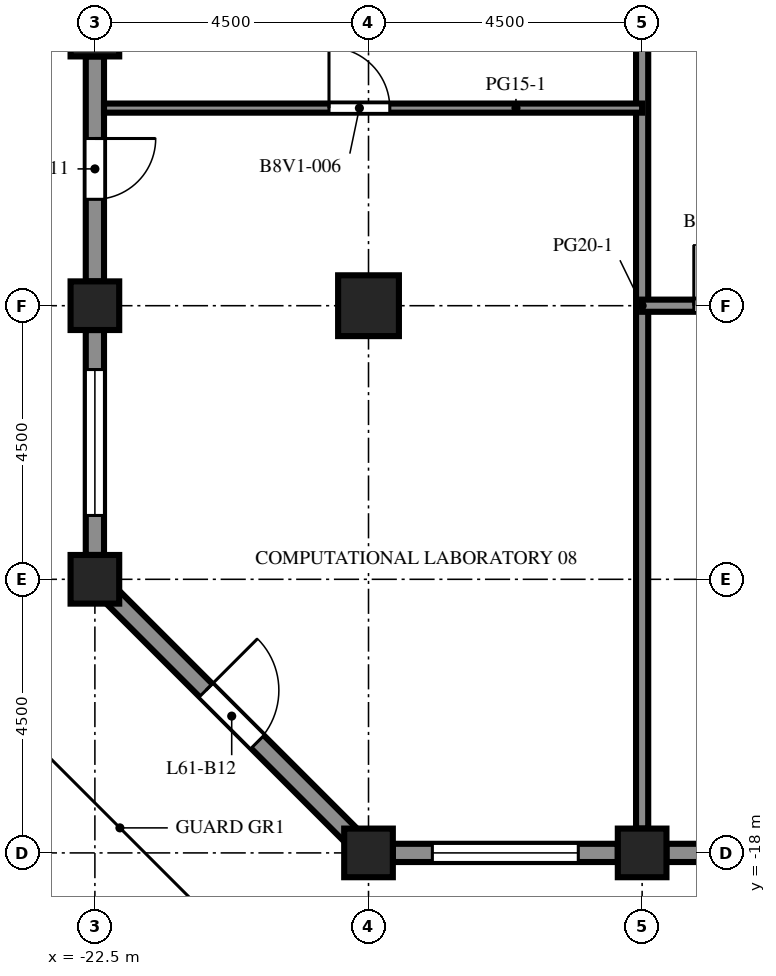
"""IFC4 building model, lengths in metres.
Left out: names, types, materials, properties, quantities, classifications, styles, units other than length and angle.
Written with IfcOpenShell. Run it as: python <this file> out.ifc"""

import sys

from ifc_helpers import new_model, si_unit, direction, frame, frame_2d, origin, origin_2d, place, context, subcontext, project, spatial, rectangle, extrude, element, fill, save


model = new_model("IFC4")
c1 = context("Model", 3, precision=1e-05, world=origin(), true_north=direction((0.0, 1.0)))
c2 = subcontext(c1, "Body", "Model", "MODEL_VIEW")
j1 = project(units=[si_unit("LENGTHUNIT", "METRE"), si_unit("PLANEANGLEUNIT", "RADIAN")], contexts=[c1])
p1 = place(None, origin())
s1 = spatial("IfcSite", under=j1, at=p1, CompositionType="ELEMENT")
p2 = place(p1, origin())
s2 = spatial("IfcBuilding", under=s1, at=p2, CompositionType="ELEMENT")
p3 = place(p2, frame((0.0, 0.0, 270.4)))
s3 = spatial("IfcBuildingStorey", under=s2, at=p3, CompositionType="ELEMENT", Elevation=270.4)
for number, where, z_axis, x_axis in (
    (1, (-22.5, -13.5, 0.0), (0.0, 0.0, 1.0), (1.0, 0.0, 0.0)),
    (2, (-22.5, -9.0, 0.0), (0.0, 0.0, 1.0), (1.0, 0.0, 0.0)),
    (3, (-22.5, -4.5, 0.0), (0.0, 0.0, 1.0), (1.0, 0.0, 0.0)),
    (4, (-18.0, -18.0, 0.0), (0.0, 0.0, 1.0), (1.0, 0.0, 0.0)),
    (5, (-13.5, -18.0, 0.0), (0.0, 0.0, 1.0), (1.0, 0.0, 0.0)),
):
    element("IfcColumn", number, at=place(p3, frame(where, z_axis=z_axis, x_axis=x_axis)), inside=s3, PredefinedType="COLUMN", context=c2, shape_type="SweptSolid", body=[
        extrude(rectangle(XDim=0.8, YDim=0.8, at=origin_2d()), origin(), (0.0, 0.0, 1.0), 4.1),
    ])
p4 = place(p3, frame((-18.0, -9.0, 0.0), z_axis=(0.0, 0.0, 1.0), x_axis=(1.0, 0.0, 0.0)))
e6 = element("IfcColumn", 6, at=p4, inside=s3, PredefinedType="COLUMN", context=c2, shape_type="SweptSolid", body=[
    extrude(rectangle(XDim=1.0, YDim=1.0, at=origin_2d()), origin(), (0.0, 0.0, 1.0), 4.1),
])
p5 = place(p3, frame((-13.9, -18.0, 0.0), z_axis=(0.0, 0.0, 1.0), x_axis=(-1.0, 0.0, 0.0)))
e7 = element("IfcWall", 7, at=p5, inside=s3, PredefinedType="SOLIDWALL", context=c2, shape_type="SweptSolid", body=[
    extrude(rectangle(XDim=3.7, YDim=0.3, at=frame_2d((1.85, 0.0))), origin(), (0.0, 0.0, 1.0), 2.85),
])
p6 = place(p5, frame((0.65, 0.0, 0.8)))
e8 = element("IfcOpeningElement", 8, at=p6, cuts=e7, PredefinedType="OPENING", context=c2, shape_type="SweptSolid", body=[
    extrude(rectangle(XDim=2.4, YDim=1.7, at=frame_2d((1.2, 0.85))), frame((0.0, 0.16, 0.0), z_axis=(0.0, -1.0, 0.0), x_axis=(1.0, 0.0, 0.0)), (0.0, 0.0, 1.0), 0.32),
])
p7 = place(p3, frame((-9.4, -18.0, 0.0), z_axis=(0.0, 0.0, 1.0), x_axis=(-1.0, 0.0, 0.0)))
e9 = element("IfcWall", 9, at=p7, inside=s3, PredefinedType="SOLIDWALL", context=c2, shape_type="SweptSolid", body=[
    extrude(rectangle(XDim=3.7, YDim=0.3, at=frame_2d((1.85, 0.0))), origin(), (0.0, 0.0, 1.0), 2.85),
])
p8 = place(p7, frame((1.35, 0.0, 0.0)))
e10 = element("IfcOpeningElement", 10, at=p8, cuts=e9, PredefinedType="OPENING", context=c2, shape_type="SweptSolid", body=[
    extrude(rectangle(XDim=1.0, YDim=2.2, at=frame_2d((0.5, 1.1))), frame((0.0, 0.16, 0.0), z_axis=(0.0, -1.0, 0.0), x_axis=(1.0, 0.0, 0.0)), (0.0, 0.0, 1.0), 0.32),
])
p9 = place(p3, frame((-22.5, -8.6, 0.0), z_axis=(0.0, 0.0, 1.0), x_axis=(0.0, 1.0, 0.0)))
e11 = element("IfcWall", 11, at=p9, inside=s3, PredefinedType="SOLIDWALL", context=c2, shape_type="SweptSolid", body=[
    extrude(rectangle(XDim=3.7, YDim=0.3, at=frame_2d((1.85, 0.0))), origin(), (0.0, 0.0, 1.0), 2.85),
])
p10 = place(p9, frame((1.35, 0.0, 0.0)))
e12 = element("IfcOpeningElement", 12, at=p10, cuts=e11, PredefinedType="OPENING", context=c2, shape_type="SweptSolid", body=[
    extrude(rectangle(XDim=1.0, YDim=2.2, at=frame_2d((0.5, 1.1))), frame((0.0, 0.16, 0.0), z_axis=(0.0, -1.0, 0.0), x_axis=(1.0, 0.0, 0.0)), (0.0, 0.0, 1.0), 0.32),
])
p11 = place(p3, frame((-22.5, -13.1, 0.0), z_axis=(0.0, 0.0, 1.0), x_axis=(0.0, 1.0, 0.0)))
e13 = element("IfcWall", 13, at=p11, inside=s3, PredefinedType="SOLIDWALL", context=c2, shape_type="SweptSolid", body=[
    extrude(rectangle(XDim=3.7, YDim=0.3, at=frame_2d((1.85, 0.0))), origin(), (0.0, 0.0, 1.0), 2.85),
])
p12 = place(p11, frame((0.65, 0.0, 0.8)))
e14 = element("IfcOpeningElement", 14, at=p12, cuts=e13, PredefinedType="OPENING", context=c2, shape_type="SweptSolid", body=[
    extrude(rectangle(XDim=2.4, YDim=1.7, at=frame_2d((1.2, 0.85))), frame((0.0, 0.16, 0.0), z_axis=(0.0, -1.0, 0.0), x_axis=(1.0, 0.0, 0.0)), (0.0, 0.0, 1.0), 0.32),
])
p13 = place(p3, frame((-18.294, -17.706, 0.0), z_axis=(0.0, 0.0, 1.0), x_axis=(-0.707106781187, 0.707106781187, 0.0)))
e15 = element("IfcWall", 15, at=p13, inside=s3, PredefinedType="SOLIDWALL", context=c2, shape_type="SweptSolid", body=[
    extrude(rectangle(XDim=5.532, YDim=0.3, at=frame_2d((2.766, 0.0))), origin(), (0.0, 0.0, 1.0), 2.85),
])
p14 = place(p13, frame((2.166, 0.0, 0.0)))
e16 = element("IfcOpeningElement", 16, at=p14, cuts=e15, PredefinedType="OPENING", context=c2, shape_type="SweptSolid", body=[
    extrude(rectangle(XDim=1.2, YDim=2.2, at=frame_2d((0.6, 1.1))), frame((0.0, 0.16, 0.0), z_axis=(0.0, -1.0, 0.0), x_axis=(1.0, 0.0, 0.0)), (0.0, 0.0, 1.0), 0.32),
])
p15 = place(p3, frame((-13.5, -17.6, 0.0), z_axis=(0.0, 0.0, 1.0), x_axis=(0.0, 1.0, 0.0)))
e17 = element("IfcWall", 17, at=p15, inside=s3, PredefinedType="PARTITIONING", context=c2, shape_type="SweptSolid", body=[
    extrude(rectangle(XDim=20.85, YDim=0.2, at=frame_2d((10.425, 0.0))), origin(), (0.0, 0.0, 1.0), 3.65),
])
p16 = place(p15, frame((17.2, 0.0, 0.0)))
e18 = element("IfcOpeningElement", 18, at=p16, cuts=e17, PredefinedType="OPENING", context=c2, shape_type="SweptSolid", body=[
    extrude(rectangle(XDim=1.0, YDim=2.1, at=frame_2d((0.5, 1.05))), frame((0.0, 0.11, 0.0), z_axis=(0.0, -1.0, 0.0), x_axis=(1.0, 0.0, 0.0)), (0.0, 0.0, 1.0), 0.22),
])
p17 = place(p3, frame((-10.5, -9.0, 0.0), z_axis=(0.0, 0.0, 1.0), x_axis=(-1.0, 0.0, 0.0)))
e19 = element("IfcWall", 19, at=p17, inside=s3, PredefinedType="PARTITIONING", context=c2, shape_type="SweptSolid", body=[
    extrude(rectangle(XDim=3.0, YDim=0.2, at=frame_2d((1.5, 0.0))), origin(), (0.0, 0.0, 1.0), 3.65),
])
p18 = place(p17, frame((1.15, 0.0, 0.0)))
e20 = element("IfcOpeningElement", 20, at=p18, cuts=e19, PredefinedType="OPENING", context=c2, shape_type="SweptSolid", body=[
    extrude(rectangle(XDim=1.0, YDim=2.1, at=frame_2d((0.5, 1.05))), frame((0.0, 0.11, 0.0), z_axis=(0.0, -1.0, 0.0), x_axis=(1.0, 0.0, 0.0)), (0.0, 0.0, 1.0), 0.22),
])
p19 = place(p3, frame((-13.5, -5.75, 0.0), z_axis=(0.0, 0.0, 1.0), x_axis=(-1.0, 0.0, 0.0)))
e21 = element("IfcWall", 21, at=p19, inside=s3, PredefinedType="PARTITIONING", context=c2, shape_type="SweptSolid", body=[
    extrude(rectangle(XDim=8.85, YDim=0.15, at=frame_2d((4.425, 0.0))), origin(), (0.0, 0.0, 1.0), 3.65),
])
p20 = place(p19, frame((4.15, 0.0, 0.0)))
e22 = element("IfcOpeningElement", 22, at=p20, cuts=e21, PredefinedType="OPENING", context=c2, shape_type="SweptSolid", body=[
    extrude(rectangle(XDim=1.0, YDim=2.1, at=frame_2d((0.5, 1.05))), frame((0.0, 0.085, 0.0), z_axis=(0.0, -1.0, 0.0), x_axis=(1.0, 0.0, 0.0)), (0.0, 0.0, 1.0), 0.17),
])
p21 = place(p6, origin())
e23 = element("IfcWindow", 23, at=p21, inside=s3, PartitioningType="SINGLE_PANEL", PredefinedType="WINDOW", context=c2, shape_type="SweptSolid", body=[
    extrude(rectangle(XDim=2.4, YDim=1.7, at=frame_2d((1.2, 0.85))), frame((0.0, 0.03, 0.0), z_axis=(0.0, -1.0, 0.0), x_axis=(1.0, 0.0, 0.0)), (0.0, 0.0, 1.0), 0.06),
])
fill(e8, e23)
p22 = place(p10, origin())
e24 = element("IfcDoor", 24, at=p22, inside=s3, OperationType="SINGLE_SWING_RIGHT", PredefinedType="DOOR", context=c2, shape_type="SweptSolid", body=[
    extrude(rectangle(XDim=1.0, YDim=2.2, at=frame_2d((0.5, 1.1))), frame((0.0, 0.025, 0.0), z_axis=(0.0, -1.0, 0.0), x_axis=(1.0, 0.0, 0.0)), (0.0, 0.0, 1.0), 0.05),
])
fill(e12, e24)
p23 = place(p12, origin())
e25 = element("IfcWindow", 25, at=p23, inside=s3, PartitioningType="SINGLE_PANEL", PredefinedType="WINDOW", context=c2, shape_type="SweptSolid", body=[
    extrude(rectangle(XDim=2.4, YDim=1.7, at=frame_2d((1.2, 0.85))), frame((0.0, 0.03, 0.0), z_axis=(0.0, -1.0, 0.0), x_axis=(1.0, 0.0, 0.0)), (0.0, 0.0, 1.0), 0.06),
])
fill(e14, e25)
p24 = place(p14, origin())
e26 = element("IfcDoor", 26, at=p24, inside=s3, OperationType="SINGLE_SWING_RIGHT", PredefinedType="DOOR", context=c2, shape_type="SweptSolid", body=[
    extrude(rectangle(XDim=1.2, YDim=2.2, at=frame_2d((0.6, 1.1))), frame((0.0, 0.025, 0.0), z_axis=(0.0, -1.0, 0.0), x_axis=(1.0, 0.0, 0.0)), (0.0, 0.0, 1.0), 0.05),
])
fill(e16, e26)
p25 = place(p18, origin())
e27 = element("IfcDoor", 27, at=p25, inside=s3, OperationType="SINGLE_SWING_RIGHT", PredefinedType="DOOR", context=c2, shape_type="SweptSolid", body=[
    extrude(rectangle(XDim=1.0, YDim=2.1, at=frame_2d((0.5, 1.05))), frame((0.0, 0.025, 0.0), z_axis=(0.0, -1.0, 0.0), x_axis=(1.0, 0.0, 0.0)), (0.0, 0.0, 1.0), 0.05),
])
fill(e20, e27)
p26 = place(p20, origin())
e28 = element("IfcDoor", 28, at=p26, inside=s3, OperationType="SINGLE_SWING_RIGHT", PredefinedType="DOOR", context=c2, shape_type="SweptSolid", body=[
    extrude(rectangle(XDim=1.0, YDim=2.1, at=frame_2d((0.5, 1.05))), frame((0.0, 0.025, 0.0), z_axis=(0.0, -1.0, 0.0), x_axis=(1.0, 0.0, 0.0)), (0.0, 0.0, 1.0), 0.05),
])
fill(e22, e28)
save(model, sys.argv[1])
